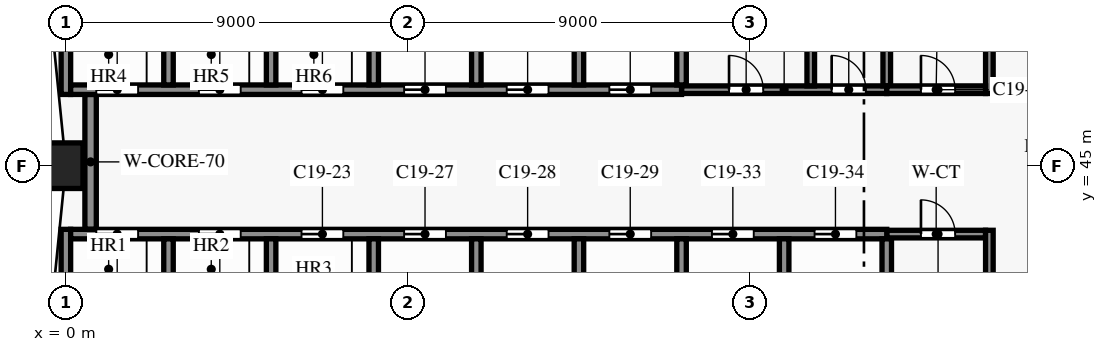
"""IFC4 building model, lengths in metres.
Left out: names, types, materials, properties, quantities, classifications, styles, units other than length and angle.
Written with IfcOpenShell. Run it as: python <this file> out.ifc"""

import sys

from ifc_helpers import new_model, si_unit, direction, frame, frame_2d, origin, origin_2d, place, context, subcontext, project, spatial, rectangle, extrude, element, fill, save


model = new_model("IFC4")
c1 = context("Model", 3, precision=1e-05, world=origin(), true_north=direction((0.0, 1.0)))
c2 = subcontext(c1, "Body", "Model", "MODEL_VIEW")
j1 = project(units=[si_unit("LENGTHUNIT", "METRE"), si_unit("PLANEANGLEUNIT", "RADIAN")], contexts=[c1])
p1 = place(None, origin())
s1 = spatial("IfcSite", under=j1, at=p1, CompositionType="ELEMENT")
p2 = place(p1, origin())
s2 = spatial("IfcBuilding", under=s1, at=p2, CompositionType="ELEMENT")
p3 = place(p2, frame((0.0, 0.0, 137.9)))
s3 = spatial("IfcBuildingStorey", under=s2, at=p3, CompositionType="ELEMENT", Elevation=137.9)
p4 = place(p3, frame((0.0, 45.0, 0.0), z_axis=(0.0, 0.0, 1.0), x_axis=(0.0, -1.0, 0.0)))
e1 = element("IfcColumn", 1, at=p4, inside=s3, PredefinedType="COLUMN", context=c2, shape_type="SweptSolid", body=[
    extrude(rectangle(XDim=0.9, YDim=1.2, at=origin_2d()), origin(), (0.0, 0.0, 1.0), 5.5),
])
p5 = place(p3, frame((21.6, 43.2, 0.0), z_axis=(0.0, 0.0, 1.0), x_axis=(1.0, 0.0, 0.0)))
e2 = element("IfcWall", 2, at=p5, inside=s3, PredefinedType="PARTITIONING", context=c2, shape_type="SweptSolid", body=[
    extrude(rectangle(XDim=2.6, YDim=0.2, at=frame_2d((1.3, 0.0))), origin(), (0.0, 0.0, 1.0), 5.2),
])
p6 = place(p5, frame((0.9, 0.0, 0.0)))
e3 = element("IfcOpeningElement", 3, at=p6, cuts=e2, PredefinedType="OPENING", context=c2, shape_type="SweptSolid", body=[
    extrude(rectangle(XDim=0.9, YDim=2.1, at=frame_2d((0.45, 1.05))), frame((0.0, 0.11, 0.0), z_axis=(0.0, -1.0, 0.0), x_axis=(1.0, 0.0, 0.0)), (0.0, 0.0, 1.0), 0.22),
])
p7 = place(p3, frame((0.125, 43.2, 0.0), z_axis=(0.0, 0.0, 1.0), x_axis=(1.0, 0.0, 0.0)))
e4 = element("IfcWall", 4, at=p7, inside=s3, PredefinedType="SHEAR", context=c2, shape_type="SweptSolid", body=[
    extrude(rectangle(XDim=21.475, YDim=0.25, at=frame_2d((10.738, 0.0))), origin(), (0.0, 0.0, 1.0), 5.2),
])
p8 = place(p7, frame((0.675, 0.0, 0.0)))
e5 = element("IfcOpeningElement", 5, at=p8, cuts=e4, PredefinedType="OPENING", context=c2, shape_type="SweptSolid", body=[
    extrude(rectangle(XDim=1.1, YDim=2.1, at=frame_2d((0.55, 1.05))), frame((0.0, 0.135, 0.0), z_axis=(0.0, -1.0, 0.0), x_axis=(1.0, 0.0, 0.0)), (0.0, 0.0, 1.0), 0.27),
])
p9 = place(p7, frame((3.375, 0.0, 0.0)))
e6 = element("IfcOpeningElement", 6, at=p9, cuts=e4, PredefinedType="OPENING", context=c2, shape_type="SweptSolid", body=[
    extrude(rectangle(XDim=1.1, YDim=2.1, at=frame_2d((0.55, 1.05))), frame((0.0, 0.135, 0.0), z_axis=(0.0, -1.0, 0.0), x_axis=(1.0, 0.0, 0.0)), (0.0, 0.0, 1.0), 0.27),
])
p10 = place(p7, frame((6.075, 0.0, 0.0)))
e7 = element("IfcOpeningElement", 7, at=p10, cuts=e4, PredefinedType="OPENING", context=c2, shape_type="SweptSolid", body=[
    extrude(rectangle(XDim=1.1, YDim=2.1, at=frame_2d((0.55, 1.05))), frame((0.0, 0.135, 0.0), z_axis=(0.0, -1.0, 0.0), x_axis=(1.0, 0.0, 0.0)), (0.0, 0.0, 1.0), 0.27),
])
p11 = place(p7, frame((8.775, 0.0, 0.0)))
e8 = element("IfcOpeningElement", 8, at=p11, cuts=e4, PredefinedType="OPENING", context=c2, shape_type="SweptSolid", body=[
    extrude(rectangle(XDim=1.1, YDim=2.1, at=frame_2d((0.55, 1.05))), frame((0.0, 0.135, 0.0), z_axis=(0.0, -1.0, 0.0), x_axis=(1.0, 0.0, 0.0)), (0.0, 0.0, 1.0), 0.27),
])
p12 = place(p7, frame((11.475, 0.0, 0.0)))
e9 = element("IfcOpeningElement", 9, at=p12, cuts=e4, PredefinedType="OPENING", context=c2, shape_type="SweptSolid", body=[
    extrude(rectangle(XDim=1.1, YDim=2.1, at=frame_2d((0.55, 1.05))), frame((0.0, 0.135, 0.0), z_axis=(0.0, -1.0, 0.0), x_axis=(1.0, 0.0, 0.0)), (0.0, 0.0, 1.0), 0.27),
])
p13 = place(p7, frame((14.175, 0.0, 0.0)))
e10 = element("IfcOpeningElement", 10, at=p13, cuts=e4, PredefinedType="OPENING", context=c2, shape_type="SweptSolid", body=[
    extrude(rectangle(XDim=1.1, YDim=2.1, at=frame_2d((0.55, 1.05))), frame((0.0, 0.135, 0.0), z_axis=(0.0, -1.0, 0.0), x_axis=(1.0, 0.0, 0.0)), (0.0, 0.0, 1.0), 0.27),
])
p14 = place(p7, frame((16.875, 0.0, 0.0)))
e11 = element("IfcOpeningElement", 11, at=p14, cuts=e4, PredefinedType="OPENING", context=c2, shape_type="SweptSolid", body=[
    extrude(rectangle(XDim=1.1, YDim=2.1, at=frame_2d((0.55, 1.05))), frame((0.0, 0.135, 0.0), z_axis=(0.0, -1.0, 0.0), x_axis=(1.0, 0.0, 0.0)), (0.0, 0.0, 1.0), 0.27),
])
p15 = place(p7, frame((19.575, 0.0, 0.0)))
e12 = element("IfcOpeningElement", 12, at=p15, cuts=e4, PredefinedType="OPENING", context=c2, shape_type="SweptSolid", body=[
    extrude(rectangle(XDim=1.1, YDim=2.1, at=frame_2d((0.55, 1.05))), frame((0.0, 0.135, 0.0), z_axis=(0.0, -1.0, 0.0), x_axis=(1.0, 0.0, 0.0)), (0.0, 0.0, 1.0), 0.27),
])
p16 = place(p3, frame((16.2, 47.0, 0.0), z_axis=(0.0, 0.0, 1.0), x_axis=(1.0, 0.0, 0.0)))
e13 = element("IfcWall", 13, at=p16, inside=s3, PredefinedType="PARTITIONING", context=c2, shape_type="SweptSolid", body=[
    extrude(rectangle(XDim=5.4, YDim=0.2, at=frame_2d((2.7, 0.0))), origin(), (0.0, 0.0, 1.0), 5.2),
])
p17 = place(p16, frame((1.25, 0.0, 0.0)))
e14 = element("IfcOpeningElement", 14, at=p17, cuts=e13, PredefinedType="OPENING", context=c2, shape_type="SweptSolid", body=[
    extrude(rectangle(XDim=0.9, YDim=2.1, at=frame_2d((0.45, 1.05))), frame((0.0, 0.11, 0.0), z_axis=(0.0, -1.0, 0.0), x_axis=(1.0, 0.0, 0.0)), (0.0, 0.0, 1.0), 0.22),
])
p18 = place(p16, frame((3.95, 0.0, 0.0)))
e15 = element("IfcOpeningElement", 15, at=p18, cuts=e13, PredefinedType="OPENING", context=c2, shape_type="SweptSolid", body=[
    extrude(rectangle(XDim=0.9, YDim=2.1, at=frame_2d((0.45, 1.05))), frame((0.0, 0.11, 0.0), z_axis=(0.0, -1.0, 0.0), x_axis=(1.0, 0.0, 0.0)), (0.0, 0.0, 1.0), 0.22),
])
p19 = place(p3, frame((21.6, 47.0, 0.0), z_axis=(0.0, 0.0, 1.0), x_axis=(1.0, 0.0, 0.0)))
e16 = element("IfcWall", 16, at=p19, inside=s3, PredefinedType="PARTITIONING", context=c2, shape_type="SweptSolid", body=[
    extrude(rectangle(XDim=2.6, YDim=0.2, at=frame_2d((1.3, 0.0))), origin(), (0.0, 0.0, 1.0), 5.2),
])
p20 = place(p19, frame((0.9, 0.0, 0.0)))
e17 = element("IfcOpeningElement", 17, at=p20, cuts=e16, PredefinedType="OPENING", context=c2, shape_type="SweptSolid", body=[
    extrude(rectangle(XDim=0.9, YDim=2.1, at=frame_2d((0.45, 1.05))), frame((0.0, 0.11, 0.0), z_axis=(0.0, -1.0, 0.0), x_axis=(1.0, 0.0, 0.0)), (0.0, 0.0, 1.0), 0.22),
])
p21 = place(p3, frame((0.125, 47.0, 0.0), z_axis=(0.0, 0.0, 1.0), x_axis=(1.0, 0.0, 0.0)))
e18 = element("IfcWall", 18, at=p21, inside=s3, PredefinedType="SHEAR", context=c2, shape_type="SweptSolid", body=[
    extrude(rectangle(XDim=16.075, YDim=0.25, at=frame_2d((8.038, 0.0))), origin(), (0.0, 0.0, 1.0), 5.2),
])
p22 = place(p21, frame((0.675, 0.0, 0.0)))
e19 = element("IfcOpeningElement", 19, at=p22, cuts=e18, PredefinedType="OPENING", context=c2, shape_type="SweptSolid", body=[
    extrude(rectangle(XDim=1.1, YDim=2.1, at=frame_2d((0.55, 1.05))), frame((0.0, 0.135, 0.0), z_axis=(0.0, -1.0, 0.0), x_axis=(1.0, 0.0, 0.0)), (0.0, 0.0, 1.0), 0.27),
])
p23 = place(p21, frame((3.375, 0.0, 0.0)))
e20 = element("IfcOpeningElement", 20, at=p23, cuts=e18, PredefinedType="OPENING", context=c2, shape_type="SweptSolid", body=[
    extrude(rectangle(XDim=1.1, YDim=2.1, at=frame_2d((0.55, 1.05))), frame((0.0, 0.135, 0.0), z_axis=(0.0, -1.0, 0.0), x_axis=(1.0, 0.0, 0.0)), (0.0, 0.0, 1.0), 0.27),
])
p24 = place(p21, frame((6.075, 0.0, 0.0)))
e21 = element("IfcOpeningElement", 21, at=p24, cuts=e18, PredefinedType="OPENING", context=c2, shape_type="SweptSolid", body=[
    extrude(rectangle(XDim=1.1, YDim=2.1, at=frame_2d((0.55, 1.05))), frame((0.0, 0.135, 0.0), z_axis=(0.0, -1.0, 0.0), x_axis=(1.0, 0.0, 0.0)), (0.0, 0.0, 1.0), 0.27),
])
p25 = place(p21, frame((8.775, 0.0, 0.0)))
e22 = element("IfcOpeningElement", 22, at=p25, cuts=e18, PredefinedType="OPENING", context=c2, shape_type="SweptSolid", body=[
    extrude(rectangle(XDim=1.1, YDim=2.1, at=frame_2d((0.55, 1.05))), frame((0.0, 0.135, 0.0), z_axis=(0.0, -1.0, 0.0), x_axis=(1.0, 0.0, 0.0)), (0.0, 0.0, 1.0), 0.27),
])
p26 = place(p21, frame((11.475, 0.0, 0.0)))
e23 = element("IfcOpeningElement", 23, at=p26, cuts=e18, PredefinedType="OPENING", context=c2, shape_type="SweptSolid", body=[
    extrude(rectangle(XDim=1.1, YDim=2.1, at=frame_2d((0.55, 1.05))), frame((0.0, 0.135, 0.0), z_axis=(0.0, -1.0, 0.0), x_axis=(1.0, 0.0, 0.0)), (0.0, 0.0, 1.0), 0.27),
])
p27 = place(p21, frame((14.175, 0.0, 0.0)))
e24 = element("IfcOpeningElement", 24, at=p27, cuts=e18, PredefinedType="OPENING", context=c2, shape_type="SweptSolid", body=[
    extrude(rectangle(XDim=1.1, YDim=2.1, at=frame_2d((0.55, 1.05))), frame((0.0, 0.135, 0.0), z_axis=(0.0, -1.0, 0.0), x_axis=(1.0, 0.0, 0.0)), (0.0, 0.0, 1.0), 0.27),
])
p28 = place(p3, frame((0.0, 39.875, 0.0), z_axis=(0.0, 0.0, 1.0), x_axis=(0.0, 1.0, 0.0)))
e25 = element("IfcWall", 25, at=p28, inside=s3, PredefinedType="SHEAR", context=c2, shape_type="SweptSolid", body=[
    extrude(rectangle(XDim=3.45, YDim=0.25, at=frame_2d((1.725, 0.0))), origin(), (0.0, 0.0, 1.0), 5.2),
])
p29 = place(p3, frame((0.0, 46.875, 0.0), z_axis=(0.0, 0.0, 1.0), x_axis=(0.0, 1.0, 0.0)))
e26 = element("IfcWall", 26, at=p29, inside=s3, PredefinedType="SHEAR", context=c2, shape_type="SweptSolid", body=[
    extrude(rectangle(XDim=3.475, YDim=0.25, at=frame_2d((1.738, 0.0))), origin(), (0.0, 0.0, 1.0), 5.2),
])
p30 = place(p3, frame((0.65, 43.325, 0.0), z_axis=(0.0, 0.0, 1.0), x_axis=(0.0, 1.0, 0.0)))
e27 = element("IfcWall", 27, at=p30, inside=s3, PredefinedType="SHEAR", context=c2, shape_type="SweptSolid", body=[
    extrude(rectangle(XDim=3.55, YDim=0.3, at=frame_2d((1.775, 0.0))), origin(), (0.0, 0.0, 1.0), 5.2),
])
for number, where, z_axis, x_axis in (
    (28, (2.7, 40.125, 0.0), (0.0, 0.0, 1.0), (0.0, 1.0, 0.0)),
    (29, (2.7, 47.125, 0.0), (0.0, 0.0, 1.0), (0.0, 1.0, 0.0)),
    (30, (5.4, 40.125, 0.0), (0.0, 0.0, 1.0), (0.0, 1.0, 0.0)),
    (31, (5.4, 47.125, 0.0), (0.0, 0.0, 1.0), (0.0, 1.0, 0.0)),
    (32, (8.1, 40.125, 0.0), (0.0, 0.0, 1.0), (0.0, 1.0, 0.0)),
    (33, (8.1, 47.125, 0.0), (0.0, 0.0, 1.0), (0.0, 1.0, 0.0)),
    (34, (10.8, 40.125, 0.0), (0.0, 0.0, 1.0), (0.0, 1.0, 0.0)),
    (35, (10.8, 47.125, 0.0), (0.0, 0.0, 1.0), (0.0, 1.0, 0.0)),
    (36, (13.5, 40.125, 0.0), (0.0, 0.0, 1.0), (0.0, 1.0, 0.0)),
    (37, (13.5, 47.125, 0.0), (0.0, 0.0, 1.0), (0.0, 1.0, 0.0)),
    (38, (16.2, 40.125, 0.0), (0.0, 0.0, 1.0), (0.0, 1.0, 0.0)),
):
    element("IfcWall", number, at=place(p3, frame(where, z_axis=z_axis, x_axis=x_axis)), inside=s3, PredefinedType="SHEAR", context=c2, shape_type="SweptSolid", body=[
        extrude(rectangle(XDim=2.95, YDim=0.25, at=frame_2d((1.475, 0.0))), origin(), (0.0, 0.0, 1.0), 5.2),
    ])
p31 = place(p3, frame((16.2, 47.125, 0.0), z_axis=(0.0, 0.0, 1.0), x_axis=(0.0, 1.0, 0.0)))
e39 = element("IfcWall", 39, at=p31, inside=s3, PredefinedType="SHEAR", context=c2, shape_type="SweptSolid", body=[
    extrude(rectangle(XDim=3.075, YDim=0.25, at=frame_2d((1.538, 0.0))), origin(), (0.0, 0.0, 1.0), 5.2),
])
p32 = place(p3, frame((18.9, 40.125, 0.0), z_axis=(0.0, 0.0, 1.0), x_axis=(0.0, 1.0, 0.0)))
e40 = element("IfcWall", 40, at=p32, inside=s3, PredefinedType="SHEAR", context=c2, shape_type="SweptSolid", body=[
    extrude(rectangle(XDim=2.95, YDim=0.25, at=frame_2d((1.475, 0.0))), origin(), (0.0, 0.0, 1.0), 5.2),
])
for number, where, z_axis, x_axis in (
    (41, (19.6, 47.1, 0.0), (0.0, 0.0, 1.0), (0.0, 1.0, 0.0)),
    (42, (21.6, 47.1, 0.0), (0.0, 0.0, 1.0), (0.0, 1.0, 0.0)),
):
    element("IfcWall", number, at=place(p3, frame(where, z_axis=z_axis, x_axis=x_axis)), inside=s3, PredefinedType="PARTITIONING", context=c2, shape_type="SweptSolid", body=[
        extrude(rectangle(XDim=4.6, YDim=0.2, at=frame_2d((2.3, 0.0))), origin(), (0.0, 0.0, 1.0), 5.2),
    ])
p33 = place(p3, frame((21.6, 40.125, 0.0), z_axis=(0.0, 0.0, 1.0), x_axis=(0.0, 1.0, 0.0)))
e43 = element("IfcWall", 43, at=p33, inside=s3, PredefinedType="SHEAR", context=c2, shape_type="SweptSolid", body=[
    extrude(rectangle(XDim=2.95, YDim=0.25, at=frame_2d((1.475, 0.0))), origin(), (0.0, 0.0, 1.0), 5.2),
])
p34 = place(p3, frame((24.3, 40.0, 0.0), z_axis=(0.0, 0.0, 1.0), x_axis=(0.0, 1.0, 0.0)))
e44 = element("IfcWall", 44, at=p34, inside=s3, PredefinedType="PARTITIONING", context=c2, shape_type="SweptSolid", body=[
    extrude(rectangle(XDim=3.3, YDim=0.2, at=frame_2d((1.65, 0.0))), origin(), (0.0, 0.0, 1.0), 5.2),
])
p35 = place(p3, frame((24.3, 46.9, 0.0), z_axis=(0.0, 0.0, 1.0), x_axis=(0.0, 1.0, 0.0)))
e45 = element("IfcWall", 45, at=p35, inside=s3, PredefinedType="SHEAR", context=c2, shape_type="SweptSolid", body=[
    extrude(rectangle(XDim=5.0, YDim=0.2, at=frame_2d((2.5, 0.0))), origin(), (0.0, 0.0, 1.0), 5.2),
])
p36 = place(p20, origin())
e46 = element("IfcDoor", 46, at=p36, inside=s3, OperationType="SINGLE_SWING_LEFT", PredefinedType="DOOR", context=c2, shape_type="SweptSolid", body=[
    extrude(rectangle(XDim=0.9, YDim=2.1, at=frame_2d((0.45, 1.05))), frame((0.0, 0.025, 0.0), z_axis=(0.0, -1.0, 0.0), x_axis=(1.0, 0.0, 0.0)), (0.0, 0.0, 1.0), 0.05),
])
fill(e17, e46)
p37 = place(p17, origin())
e47 = element("IfcDoor", 47, at=p37, inside=s3, OperationType="SINGLE_SWING_LEFT", PredefinedType="DOOR", context=c2, shape_type="SweptSolid", body=[
    extrude(rectangle(XDim=0.9, YDim=2.1, at=frame_2d((0.45, 1.05))), frame((0.0, 0.025, 0.0), z_axis=(0.0, -1.0, 0.0), x_axis=(1.0, 0.0, 0.0)), (0.0, 0.0, 1.0), 0.05),
])
fill(e14, e47)
p38 = place(p18, origin())
e48 = element("IfcDoor", 48, at=p38, inside=s3, OperationType="SINGLE_SWING_RIGHT", PredefinedType="DOOR", context=c2, shape_type="SweptSolid", body=[
    extrude(rectangle(XDim=0.9, YDim=2.1, at=frame_2d((0.45, 1.05))), frame((0.0, 0.025, 0.0), z_axis=(0.0, -1.0, 0.0), x_axis=(1.0, 0.0, 0.0)), (0.0, 0.0, 1.0), 0.05),
])
fill(e15, e48)
p39 = place(p6, origin())
e49 = element("IfcDoor", 49, at=p39, inside=s3, OperationType="SINGLE_SWING_RIGHT", PredefinedType="DOOR", context=c2, shape_type="SweptSolid", body=[
    extrude(rectangle(XDim=0.9, YDim=2.1, at=frame_2d((0.45, 1.05))), frame((0.0, 0.025, 0.0), z_axis=(0.0, -1.0, 0.0), x_axis=(1.0, 0.0, 0.0)), (0.0, 0.0, 1.0), 0.05),
])
fill(e3, e49)
p40 = place(p8, origin())
e50 = element("IfcDoor", 50, at=p40, inside=s3, OperationType="DOUBLE_DOOR_SLIDING", PredefinedType="DOOR", context=c2, shape_type="SweptSolid", body=[
    extrude(rectangle(XDim=1.1, YDim=2.1, at=frame_2d((0.55, 1.05))), frame((0.0, 0.025, 0.0), z_axis=(0.0, -1.0, 0.0), x_axis=(1.0, 0.0, 0.0)), (0.0, 0.0, 1.0), 0.05),
])
fill(e5, e50)
p41 = place(p9, origin())
e51 = element("IfcDoor", 51, at=p41, inside=s3, OperationType="DOUBLE_DOOR_SLIDING", PredefinedType="DOOR", context=c2, shape_type="SweptSolid", body=[
    extrude(rectangle(XDim=1.1, YDim=2.1, at=frame_2d((0.55, 1.05))), frame((0.0, 0.025, 0.0), z_axis=(0.0, -1.0, 0.0), x_axis=(1.0, 0.0, 0.0)), (0.0, 0.0, 1.0), 0.05),
])
fill(e6, e51)
p42 = place(p10, origin())
e52 = element("IfcDoor", 52, at=p42, inside=s3, OperationType="DOUBLE_DOOR_SLIDING", PredefinedType="DOOR", context=c2, shape_type="SweptSolid", body=[
    extrude(rectangle(XDim=1.1, YDim=2.1, at=frame_2d((0.55, 1.05))), frame((0.0, 0.025, 0.0), z_axis=(0.0, -1.0, 0.0), x_axis=(1.0, 0.0, 0.0)), (0.0, 0.0, 1.0), 0.05),
])
fill(e7, e52)
p43 = place(p22, origin())
e53 = element("IfcDoor", 53, at=p43, inside=s3, OperationType="DOUBLE_DOOR_SLIDING", PredefinedType="DOOR", context=c2, shape_type="SweptSolid", body=[
    extrude(rectangle(XDim=1.1, YDim=2.1, at=frame_2d((0.55, 1.05))), frame((0.0, 0.025, 0.0), z_axis=(0.0, -1.0, 0.0), x_axis=(1.0, 0.0, 0.0)), (0.0, 0.0, 1.0), 0.05),
])
fill(e19, e53)
p44 = place(p23, origin())
e54 = element("IfcDoor", 54, at=p44, inside=s3, OperationType="DOUBLE_DOOR_SLIDING", PredefinedType="DOOR", context=c2, shape_type="SweptSolid", body=[
    extrude(rectangle(XDim=1.1, YDim=2.1, at=frame_2d((0.55, 1.05))), frame((0.0, 0.025, 0.0), z_axis=(0.0, -1.0, 0.0), x_axis=(1.0, 0.0, 0.0)), (0.0, 0.0, 1.0), 0.05),
])
fill(e20, e54)
p45 = place(p24, origin())
e55 = element("IfcDoor", 55, at=p45, inside=s3, OperationType="DOUBLE_DOOR_SLIDING", PredefinedType="DOOR", context=c2, shape_type="SweptSolid", body=[
    extrude(rectangle(XDim=1.1, YDim=2.1, at=frame_2d((0.55, 1.05))), frame((0.0, 0.025, 0.0), z_axis=(0.0, -1.0, 0.0), x_axis=(1.0, 0.0, 0.0)), (0.0, 0.0, 1.0), 0.05),
])
fill(e21, e55)
p46 = place(p11, origin())
e56 = element("IfcDoor", 56, at=p46, inside=s3, OperationType="DOUBLE_DOOR_SLIDING", PredefinedType="DOOR", context=c2, shape_type="SweptSolid", body=[
    extrude(rectangle(XDim=1.1, YDim=2.1, at=frame_2d((0.55, 1.05))), frame((0.0, 0.025, 0.0), z_axis=(0.0, -1.0, 0.0), x_axis=(1.0, 0.0, 0.0)), (0.0, 0.0, 1.0), 0.05),
])
fill(e8, e56)
p47 = place(p12, origin())
e57 = element("IfcDoor", 57, at=p47, inside=s3, OperationType="DOUBLE_DOOR_SLIDING", PredefinedType="DOOR", context=c2, shape_type="SweptSolid", body=[
    extrude(rectangle(XDim=1.1, YDim=2.1, at=frame_2d((0.55, 1.05))), frame((0.0, 0.025, 0.0), z_axis=(0.0, -1.0, 0.0), x_axis=(1.0, 0.0, 0.0)), (0.0, 0.0, 1.0), 0.05),
])
fill(e9, e57)
p48 = place(p13, origin())
e58 = element("IfcDoor", 58, at=p48, inside=s3, OperationType="DOUBLE_DOOR_SLIDING", PredefinedType="DOOR", context=c2, shape_type="SweptSolid", body=[
    extrude(rectangle(XDim=1.1, YDim=2.1, at=frame_2d((0.55, 1.05))), frame((0.0, 0.025, 0.0), z_axis=(0.0, -1.0, 0.0), x_axis=(1.0, 0.0, 0.0)), (0.0, 0.0, 1.0), 0.05),
])
fill(e10, e58)
p49 = place(p25, origin())
e59 = element("IfcDoor", 59, at=p49, inside=s3, OperationType="DOUBLE_DOOR_SLIDING", PredefinedType="DOOR", context=c2, shape_type="SweptSolid", body=[
    extrude(rectangle(XDim=1.1, YDim=2.1, at=frame_2d((0.55, 1.05))), frame((0.0, 0.025, 0.0), z_axis=(0.0, -1.0, 0.0), x_axis=(1.0, 0.0, 0.0)), (0.0, 0.0, 1.0), 0.05),
])
fill(e22, e59)
p50 = place(p26, origin())
e60 = element("IfcDoor", 60, at=p50, inside=s3, OperationType="DOUBLE_DOOR_SLIDING", PredefinedType="DOOR", context=c2, shape_type="SweptSolid", body=[
    extrude(rectangle(XDim=1.1, YDim=2.1, at=frame_2d((0.55, 1.05))), frame((0.0, 0.025, 0.0), z_axis=(0.0, -1.0, 0.0), x_axis=(1.0, 0.0, 0.0)), (0.0, 0.0, 1.0), 0.05),
])
fill(e23, e60)
p51 = place(p27, origin())
e61 = element("IfcDoor", 61, at=p51, inside=s3, OperationType="DOUBLE_DOOR_SLIDING", PredefinedType="DOOR", context=c2, shape_type="SweptSolid", body=[
    extrude(rectangle(XDim=1.1, YDim=2.1, at=frame_2d((0.55, 1.05))), frame((0.0, 0.025, 0.0), z_axis=(0.0, -1.0, 0.0), x_axis=(1.0, 0.0, 0.0)), (0.0, 0.0, 1.0), 0.05),
])
fill(e24, e61)
p52 = place(p14, origin())
e62 = element("IfcDoor", 62, at=p52, inside=s3, OperationType="DOUBLE_DOOR_SLIDING", PredefinedType="DOOR", context=c2, shape_type="SweptSolid", body=[
    extrude(rectangle(XDim=1.1, YDim=2.1, at=frame_2d((0.55, 1.05))), frame((0.0, 0.025, 0.0), z_axis=(0.0, -1.0, 0.0), x_axis=(1.0, 0.0, 0.0)), (0.0, 0.0, 1.0), 0.05),
])
fill(e11, e62)
p53 = place(p15, origin())
e63 = element("IfcDoor", 63, at=p53, inside=s3, OperationType="DOUBLE_DOOR_SLIDING", PredefinedType="DOOR", context=c2, shape_type="SweptSolid", body=[
    extrude(rectangle(XDim=1.1, YDim=2.1, at=frame_2d((0.55, 1.05))), frame((0.0, 0.025, 0.0), z_axis=(0.0, -1.0, 0.0), x_axis=(1.0, 0.0, 0.0)), (0.0, 0.0, 1.0), 0.05),
])
fill(e12, e63)
save(model, sys.argv[1])
